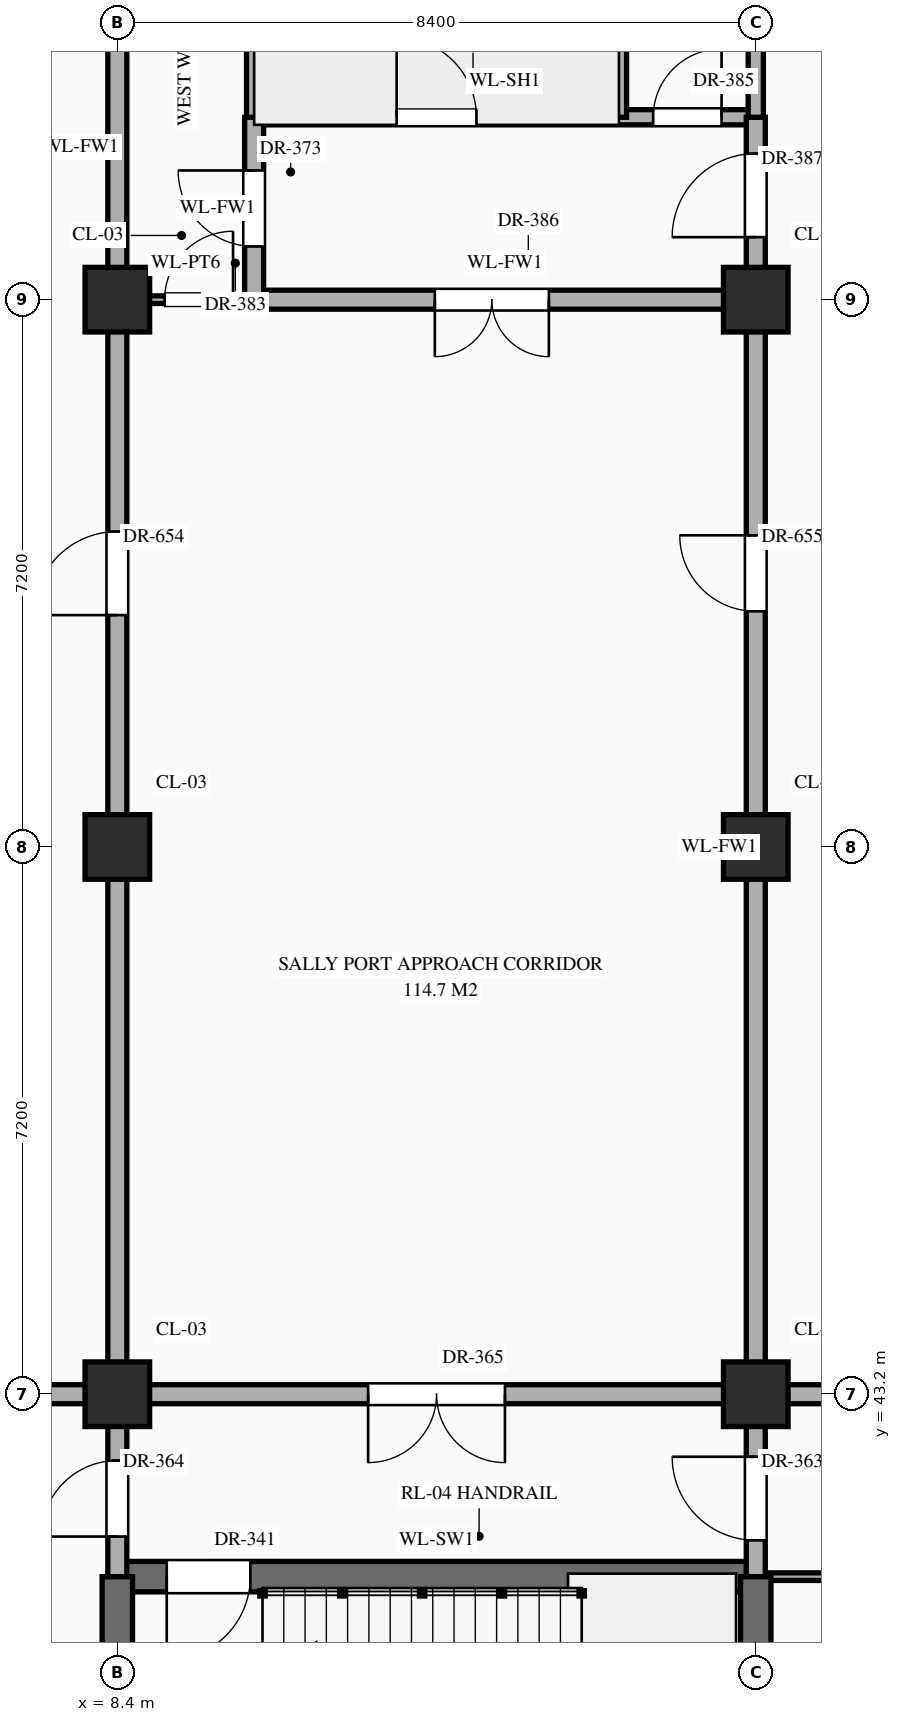
"""IFC4 building model, lengths in metres.
Left out: names, types, materials, properties, quantities, classifications, styles, units other than length and angle.
Written with IfcOpenShell. Run it as: python <this file> out.ifc"""

import sys

from ifc_helpers import new_model, si_unit, direction, frame, frame_2d, origin, origin_2d, place, context, subcontext, project, spatial, rectangle, extrude, element, fill, save


model = new_model("IFC4")
c1 = context("Model", 3, precision=1e-05, world=origin(), true_north=direction((0.0, 1.0)))
c2 = subcontext(c1, "Body", "Model", "MODEL_VIEW")
j1 = project(units=[si_unit("LENGTHUNIT", "METRE"), si_unit("PLANEANGLEUNIT", "RADIAN")], contexts=[c1])
p1 = place(None, origin())
s1 = spatial("IfcSite", under=j1, at=p1, CompositionType="ELEMENT")
p2 = place(p1, origin())
s2 = spatial("IfcBuilding", under=s1, at=p2, CompositionType="ELEMENT")
p3 = place(p2, frame((0.0, 0.0, -5.4)))
s3 = spatial("IfcBuildingStorey", under=s2, at=p3, CompositionType="ELEMENT", Elevation=-5.4)
for number, where, z_axis, x_axis in (
    (1, (8.4, 43.2, 0.0), (0.0, 0.0, 1.0), (1.0, 0.0, 0.0)),
    (2, (8.4, 50.4, 0.0), (0.0, 0.0, 1.0), (1.0, 0.0, 0.0)),
    (3, (8.4, 57.6, 0.0), (0.0, 0.0, 1.0), (1.0, 0.0, 0.0)),
    (4, (16.8, 43.2, 0.0), (0.0, 0.0, 1.0), (1.0, 0.0, 0.0)),
    (5, (16.8, 50.4, 0.0), (0.0, 0.0, 1.0), (1.0, 0.0, 0.0)),
    (6, (16.8, 57.6, 0.0), (0.0, 0.0, 1.0), (1.0, 0.0, 0.0)),
):
    element("IfcColumn", number, at=place(p3, frame(where, z_axis=z_axis, x_axis=x_axis)), inside=s3, PredefinedType="COLUMN", context=c2, shape_type="SweptSolid", body=[
        extrude(rectangle(XDim=0.85, YDim=0.85, at=origin_2d()), origin(), (0.0, 0.0, 1.0), 5.4),
    ])
p4 = place(p3, frame((8.4, 40.8, 0.0), z_axis=(0.0, 0.0, 1.0), x_axis=(1.0, 0.0, 0.0)))
e7 = element("IfcWall", 7, at=p4, inside=s3, PredefinedType="SHEAR", context=c2, shape_type="SweptSolid", body=[
    extrude(rectangle(XDim=8.4, YDim=0.4, at=frame_2d((4.2, 0.0))), origin(), (0.0, 0.0, 1.0), 5.1),
])
p5 = place(p4, frame((0.65, 0.0, 0.0)))
e8 = element("IfcOpeningElement", 8, at=p5, cuts=e7, PredefinedType="OPENING", context=c2, shape_type="SweptSolid", body=[
    extrude(rectangle(XDim=1.1, YDim=2.2, at=frame_2d((0.55, 1.1))), frame((0.0, 0.212, 0.0), z_axis=(0.0, -1.0, 0.0), x_axis=(1.0, 0.0, 0.0)), (0.0, 0.0, 1.0), 0.424),
])
p6 = place(p3, frame((16.8, 40.8, 0.0), z_axis=(0.0, 0.0, 1.0), x_axis=(1.0, 0.0, 0.0)))
e9 = element("IfcWall", 9, at=p6, inside=s3, PredefinedType="STANDARD", context=c2, shape_type="SweptSolid", body=[
    extrude(rectangle(XDim=61.6, YDim=0.1, at=frame_2d((30.8, 0.0))), origin(), (0.0, 0.0, 1.0), 4.98),
])
p7 = place(p6, frame((30.32, 0.0, 0.0)))
e10 = element("IfcOpeningElement", 10, at=p7, cuts=e9, PredefinedType="OPENING", context=c2, shape_type="SweptSolid", body=[
    extrude(rectangle(XDim=0.96, YDim=2.2, at=frame_2d((0.48, 1.1))), frame((0.0, 0.062, 0.0), z_axis=(0.0, -1.0, 0.0), x_axis=(1.0, 0.0, 0.0)), (0.0, 0.0, 1.0), 0.124),
])
p8 = place(p3, frame((0.04, 43.2, 0.0), z_axis=(0.0, 0.0, 1.0), x_axis=(1.0, 0.0, 0.0)))
e11 = element("IfcWall", 11, at=p8, inside=s3, PredefinedType="STANDARD", context=c2, shape_type="SweptSolid", body=[
    extrude(rectangle(XDim=50.36, YDim=0.25, at=frame_2d((25.18, 0.0))), origin(), (0.0, 0.0, 1.0), 4.13),
])
p9 = place(p8, frame((11.66, 0.0, 0.0)))
e12 = element("IfcOpeningElement", 12, at=p9, cuts=e11, PredefinedType="OPENING", context=c2, shape_type="SweptSolid", body=[
    extrude(rectangle(XDim=1.8, YDim=2.35, at=frame_2d((0.9, 1.175))), frame((0.0, 0.137, 0.0), z_axis=(0.0, -1.0, 0.0), x_axis=(1.0, 0.0, 0.0)), (0.0, 0.0, 1.0), 0.274),
])
p10 = place(p8, frame((28.885, 0.0, 0.0)))
e13 = element("IfcOpeningElement", 13, at=p10, cuts=e11, PredefinedType="OPENING", context=c2, shape_type="SweptSolid", body=[
    extrude(rectangle(XDim=0.95, YDim=2.15, at=frame_2d((0.475, 1.075))), frame((0.0, 0.137, 0.0), z_axis=(0.0, -1.0, 0.0), x_axis=(1.0, 0.0, 0.0)), (0.0, 0.0, 1.0), 0.274),
])
p11 = place(p3, frame((8.4, 57.6, 0.0), z_axis=(0.0, 0.0, 1.0), x_axis=(1.0, 0.0, 0.0)))
e14 = element("IfcWall", 14, at=p11, inside=s3, PredefinedType="STANDARD", context=c2, shape_type="SweptSolid", body=[
    extrude(rectangle(XDim=1.8, YDim=0.1, at=frame_2d((0.9, 0.0))), origin(), (0.0, 0.0, 1.0), 4.25),
])
p12 = place(p11, frame((0.623, 0.0, 0.0)))
e15 = element("IfcOpeningElement", 15, at=p12, cuts=e14, PredefinedType="OPENING", context=c2, shape_type="SweptSolid", body=[
    extrude(rectangle(XDim=0.9, YDim=2.15, at=frame_2d((0.45, 1.075))), frame((0.0, 0.062, 0.0), z_axis=(0.0, -1.0, 0.0), x_axis=(1.0, 0.0, 0.0)), (0.0, 0.0, 1.0), 0.124),
])
p13 = place(p3, frame((10.2, 57.6, 0.0), z_axis=(0.0, 0.0, 1.0), x_axis=(1.0, 0.0, 0.0)))
e16 = element("IfcWall", 16, at=p13, inside=s3, PredefinedType="STANDARD", context=c2, shape_type="SweptSolid", body=[
    extrude(rectangle(XDim=6.6, YDim=0.25, at=frame_2d((3.3, 0.0))), origin(), (0.0, 0.0, 1.0), 4.25),
])
p14 = place(p13, frame((2.377, 0.0, 0.0)))
e17 = element("IfcOpeningElement", 17, at=p14, cuts=e16, PredefinedType="OPENING", context=c2, shape_type="SweptSolid", body=[
    extrude(rectangle(XDim=1.5, YDim=2.25, at=frame_2d((0.75, 1.125))), frame((0.0, 0.137, 0.0), z_axis=(0.0, -1.0, 0.0), x_axis=(1.0, 0.0, 0.0)), (0.0, 0.0, 1.0), 0.274),
])
p15 = place(p3, frame((10.2, 60.0, 0.0), z_axis=(0.0, 0.0, 1.0), x_axis=(1.0, 0.0, 0.0)))
e18 = element("IfcWall", 18, at=p15, inside=s3, PredefinedType="STANDARD", context=c2, shape_type="SweptSolid", body=[
    extrude(rectangle(XDim=6.6, YDim=0.2, at=frame_2d((3.3, 0.0))), origin(), (0.0, 0.0, 1.0), 5.1),
])
p16 = place(p15, frame((1.875, 0.0, 0.0)))
e19 = element("IfcOpeningElement", 19, at=p16, cuts=e18, PredefinedType="OPENING", context=c2, shape_type="SweptSolid", body=[
    extrude(rectangle(XDim=1.05, YDim=2.2, at=frame_2d((0.525, 1.1))), frame((0.0, 0.112, 0.0), z_axis=(0.0, -1.0, 0.0), x_axis=(1.0, 0.0, 0.0)), (0.0, 0.0, 1.0), 0.224),
])
p17 = place(p15, frame((5.25, 0.0, 0.0)))
e20 = element("IfcOpeningElement", 20, at=p17, cuts=e18, PredefinedType="OPENING", context=c2, shape_type="SweptSolid", body=[
    extrude(rectangle(XDim=0.9, YDim=2.1, at=frame_2d((0.45, 1.05))), frame((0.0, 0.112, 0.0), z_axis=(0.0, -1.0, 0.0), x_axis=(1.0, 0.0, 0.0)), (0.0, 0.0, 1.0), 0.224),
])
p18 = place(p3, frame((8.4, 36.0, 0.0), z_axis=(0.0, 0.0, 1.0), x_axis=(0.0, 1.0, 0.0)))
e21 = element("IfcWall", 21, at=p18, inside=s3, PredefinedType="SHEAR", context=c2, shape_type="SweptSolid", body=[
    extrude(rectangle(XDim=4.8, YDim=0.4, at=frame_2d((2.4, 0.0))), origin(), (0.0, 0.0, 1.0), 5.1),
])
p19 = place(p3, frame((8.4, 40.8, 0.0), z_axis=(0.0, 0.0, 1.0), x_axis=(0.0, 1.0, 0.0)))
e22 = element("IfcWall", 22, at=p19, inside=s3, PredefinedType="STANDARD", context=c2, shape_type="SweptSolid", body=[
    extrude(rectangle(XDim=38.4, YDim=0.25, at=frame_2d((19.2, 0.0))), origin(), (0.0, 0.0, 1.0), 4.35),
])
p20 = place(p19, frame((0.528, 0.0, 0.0)))
e23 = element("IfcOpeningElement", 23, at=p20, cuts=e22, PredefinedType="OPENING", context=c2, shape_type="SweptSolid", body=[
    extrude(rectangle(XDim=1.0, YDim=2.2, at=frame_2d((0.5, 1.1))), frame((0.0, 0.137, 0.0), z_axis=(0.0, -1.0, 0.0), x_axis=(1.0, 0.0, 0.0)), (0.0, 0.0, 1.0), 0.274),
])
p21 = place(p19, frame((27.1, 0.0, 0.0)))
e24 = element("IfcOpeningElement", 24, at=p21, cuts=e22, PredefinedType="OPENING", context=c2, shape_type="SweptSolid", body=[
    extrude(rectangle(XDim=1.0, YDim=2.2, at=frame_2d((0.5, 1.1))), frame((0.0, 0.137, 0.0), z_axis=(0.0, -1.0, 0.0), x_axis=(1.0, 0.0, 0.0)), (0.0, 0.0, 1.0), 0.274),
])
p22 = place(p19, frame((12.65, 0.0, 0.0)))
e25 = element("IfcOpeningElement", 25, at=p22, cuts=e22, PredefinedType="OPENING", context=c2, shape_type="SweptSolid", body=[
    extrude(rectangle(XDim=1.1, YDim=2.2, at=frame_2d((0.55, 1.1))), frame((0.0, 0.137, 0.0), z_axis=(0.0, -1.0, 0.0), x_axis=(1.0, 0.0, 0.0)), (0.0, 0.0, 1.0), 0.274),
])
p23 = place(p3, frame((10.2, 57.6, 0.0), z_axis=(0.0, 0.0, 1.0), x_axis=(0.0, 1.0, 0.0)))
e26 = element("IfcWall", 26, at=p23, inside=s3, PredefinedType="STANDARD", context=c2, shape_type="SweptSolid", body=[
    extrude(rectangle(XDim=2.4, YDim=0.25, at=frame_2d((1.2, 0.0))), origin(), (0.0, 0.0, 1.0), 5.1),
])
p24 = place(p23, frame((0.7, 0.0, 0.0)))
e27 = element("IfcOpeningElement", 27, at=p24, cuts=e26, PredefinedType="OPENING", context=c2, shape_type="SweptSolid", body=[
    extrude(rectangle(XDim=1.0, YDim=2.2, at=frame_2d((0.5, 1.1))), frame((0.0, 0.137, 0.0), z_axis=(0.0, -1.0, 0.0), x_axis=(1.0, 0.0, 0.0)), (0.0, 0.0, 1.0), 0.274),
])
for number, where, z_axis, x_axis in (
    (28, (10.2, 60.0, 0.0), (0.0, 0.0, 1.0), (0.0, 1.0, 0.0)),
    (29, (15.0, 60.0, 0.0), (0.0, 0.0, 1.0), (0.0, 1.0, 0.0)),
):
    element("IfcWall", number, at=place(p3, frame(where, z_axis=z_axis, x_axis=x_axis)), inside=s3, PredefinedType="STANDARD", context=c2, shape_type="SweptSolid", body=[
        extrude(rectangle(XDim=48.0, YDim=0.2, at=frame_2d((24.0, 0.0))), origin(), (0.0, 0.0, 1.0), 5.1),
    ])
p25 = place(p3, frame((16.8, 36.0, 0.0), z_axis=(0.0, 0.0, 1.0), x_axis=(0.0, 1.0, 0.0)))
e30 = element("IfcWall", 30, at=p25, inside=s3, PredefinedType="SHEAR", context=c2, shape_type="SweptSolid", body=[
    extrude(rectangle(XDim=4.8, YDim=0.4, at=frame_2d((2.4, 0.0))), origin(), (0.0, 0.0, 1.0), 5.1),
])
p26 = place(p3, frame((16.8, 40.8, 0.0), z_axis=(0.0, 0.0, 1.0), x_axis=(0.0, 1.0, 0.0)))
e31 = element("IfcWall", 31, at=p26, inside=s3, PredefinedType="STANDARD", context=c2, shape_type="SweptSolid", body=[
    extrude(rectangle(XDim=19.2, YDim=0.25, at=frame_2d((9.6, 0.0))), origin(), (0.0, 0.0, 1.0), 4.23),
])
p27 = place(p26, frame((0.478, 0.0, 0.0)))
e32 = element("IfcOpeningElement", 32, at=p27, cuts=e31, PredefinedType="OPENING", context=c2, shape_type="SweptSolid", body=[
    extrude(rectangle(XDim=1.1, YDim=2.2, at=frame_2d((0.55, 1.1))), frame((0.0, 0.137, 0.0), z_axis=(0.0, -1.0, 0.0), x_axis=(1.0, 0.0, 0.0)), (0.0, 0.0, 1.0), 0.274),
])
p28 = place(p26, frame((17.623, 0.0, 0.0)))
e33 = element("IfcOpeningElement", 33, at=p28, cuts=e31, PredefinedType="OPENING", context=c2, shape_type="SweptSolid", body=[
    extrude(rectangle(XDim=1.1, YDim=2.2, at=frame_2d((0.55, 1.1))), frame((0.0, 0.137, 0.0), z_axis=(0.0, -1.0, 0.0), x_axis=(1.0, 0.0, 0.0)), (0.0, 0.0, 1.0), 0.274),
])
p29 = place(p26, frame((12.7, 0.0, 0.0)))
e34 = element("IfcOpeningElement", 34, at=p29, cuts=e31, PredefinedType="OPENING", context=c2, shape_type="SweptSolid", body=[
    extrude(rectangle(XDim=1.0, YDim=2.2, at=frame_2d((0.5, 1.1))), frame((0.0, 0.137, 0.0), z_axis=(0.0, -1.0, 0.0), x_axis=(1.0, 0.0, 0.0)), (0.0, 0.0, 1.0), 0.274),
])
p30 = place(p3, frame((16.8, 60.0, 0.0), z_axis=(0.0, 0.0, 1.0), x_axis=(0.0, 1.0, 0.0)))
e35 = element("IfcWall", 35, at=p30, inside=s3, PredefinedType="STANDARD", context=c2, shape_type="SweptSolid", body=[
    extrude(rectangle(XDim=26.4, YDim=0.2, at=frame_2d((13.2, 0.0))), origin(), (0.0, 0.0, 1.0), 4.23),
])
p31 = place(p5, frame((1.1, 0.0, 0.0), z_axis=(0.0, 0.0, 1.0), x_axis=(-1.0, 0.0, 0.0)))
e36 = element("IfcDoor", 36, at=p31, inside=s3, OperationType="SINGLE_SWING_RIGHT", PredefinedType="DOOR", context=c2, shape_type="SweptSolid", body=[
    extrude(rectangle(XDim=1.1, YDim=2.2, at=frame_2d((0.55, 1.1))), frame((0.0, 0.025, 0.0), z_axis=(0.0, -1.0, 0.0), x_axis=(1.0, 0.0, 0.0)), (0.0, 0.0, 1.0), 0.05),
])
fill(e8, e36)
p32 = place(p27, origin())
e37 = element("IfcDoor", 37, at=p32, inside=s3, OperationType="SINGLE_SWING_RIGHT", PredefinedType="DOOR", context=c2, shape_type="SweptSolid", body=[
    extrude(rectangle(XDim=1.1, YDim=2.2, at=frame_2d((0.55, 1.1))), frame((0.0, 0.025, 0.0), z_axis=(0.0, -1.0, 0.0), x_axis=(1.0, 0.0, 0.0)), (0.0, 0.0, 1.0), 0.05),
])
fill(e32, e37)
p33 = place(p20, origin())
e38 = element("IfcDoor", 38, at=p33, inside=s3, OperationType="SINGLE_SWING_LEFT", PredefinedType="DOOR", context=c2, shape_type="SweptSolid", body=[
    extrude(rectangle(XDim=1.0, YDim=2.2, at=frame_2d((0.5, 1.1))), frame((0.0, 0.025, 0.0), z_axis=(0.0, -1.0, 0.0), x_axis=(1.0, 0.0, 0.0)), (0.0, 0.0, 1.0), 0.05),
])
fill(e23, e38)
p34 = place(p9, frame((1.8, 0.0, 0.0), z_axis=(0.0, 0.0, 1.0), x_axis=(-1.0, 0.0, 0.0)))
e39 = element("IfcDoor", 39, at=p34, inside=s3, OperationType="DOUBLE_DOOR_SINGLE_SWING", PredefinedType="DOOR", context=c2, shape_type="SweptSolid", body=[
    extrude(rectangle(XDim=1.8, YDim=2.35, at=frame_2d((0.9, 1.175))), frame((0.0, 0.025, 0.0), z_axis=(0.0, -1.0, 0.0), x_axis=(1.0, 0.0, 0.0)), (0.0, 0.0, 1.0), 0.05),
])
fill(e12, e39)
p35 = place(p24, origin())
e40 = element("IfcDoor", 40, at=p35, inside=s3, OperationType="SINGLE_SWING_RIGHT", PredefinedType="DOOR", context=c2, shape_type="SweptSolid", body=[
    extrude(rectangle(XDim=1.0, YDim=2.2, at=frame_2d((0.5, 1.1))), frame((0.0, 0.025, 0.0), z_axis=(0.0, -1.0, 0.0), x_axis=(1.0, 0.0, 0.0)), (0.0, 0.0, 1.0), 0.05),
])
fill(e27, e40)
p36 = place(p12, origin())
e41 = element("IfcDoor", 41, at=p36, inside=s3, OperationType="SINGLE_SWING_RIGHT", PredefinedType="DOOR", context=c2, shape_type="SweptSolid", body=[
    extrude(rectangle(XDim=0.9, YDim=2.15, at=frame_2d((0.45, 1.075))), frame((0.0, 0.025, 0.0), z_axis=(0.0, -1.0, 0.0), x_axis=(1.0, 0.0, 0.0)), (0.0, 0.0, 1.0), 0.05),
])
fill(e15, e41)
p37 = place(p16, origin())
e42 = element("IfcDoor", 42, at=p37, inside=s3, OperationType="SINGLE_SWING_LEFT", PredefinedType="DOOR", context=c2, shape_type="SweptSolid", body=[
    extrude(rectangle(XDim=1.05, YDim=2.2, at=frame_2d((0.525, 1.1))), frame((0.0, 0.025, 0.0), z_axis=(0.0, -1.0, 0.0), x_axis=(1.0, 0.0, 0.0)), (0.0, 0.0, 1.0), 0.05),
])
fill(e19, e42)
p38 = place(p17, origin())
e43 = element("IfcDoor", 43, at=p38, inside=s3, OperationType="SINGLE_SWING_RIGHT", PredefinedType="DOOR", context=c2, shape_type="SweptSolid", body=[
    extrude(rectangle(XDim=0.9, YDim=2.1, at=frame_2d((0.45, 1.05))), frame((0.0, 0.025, 0.0), z_axis=(0.0, -1.0, 0.0), x_axis=(1.0, 0.0, 0.0)), (0.0, 0.0, 1.0), 0.05),
])
fill(e20, e43)
p39 = place(p14, frame((1.5, 0.0, 0.0), z_axis=(0.0, 0.0, 1.0), x_axis=(-1.0, 0.0, 0.0)))
e44 = element("IfcDoor", 44, at=p39, inside=s3, OperationType="DOUBLE_DOOR_SINGLE_SWING", PredefinedType="DOOR", context=c2, shape_type="SweptSolid", body=[
    extrude(rectangle(XDim=1.5, YDim=2.25, at=frame_2d((0.75, 1.125))), frame((0.0, 0.025, 0.0), z_axis=(0.0, -1.0, 0.0), x_axis=(1.0, 0.0, 0.0)), (0.0, 0.0, 1.0), 0.05),
])
fill(e17, e44)
p40 = place(p28, origin())
e45 = element("IfcDoor", 45, at=p40, inside=s3, OperationType="SINGLE_SWING_LEFT", PredefinedType="DOOR", context=c2, shape_type="SweptSolid", body=[
    extrude(rectangle(XDim=1.1, YDim=2.2, at=frame_2d((0.55, 1.1))), frame((0.0, 0.025, 0.0), z_axis=(0.0, -1.0, 0.0), x_axis=(1.0, 0.0, 0.0)), (0.0, 0.0, 1.0), 0.05),
])
fill(e33, e45)
p41 = place(p22, origin())
e46 = element("IfcDoor", 46, at=p41, inside=s3, OperationType="SINGLE_SWING_LEFT", PredefinedType="DOOR", context=c2, shape_type="SweptSolid", body=[
    extrude(rectangle(XDim=1.1, YDim=2.2, at=frame_2d((0.55, 1.1))), frame((0.0, 0.025, 0.0), z_axis=(0.0, -1.0, 0.0), x_axis=(1.0, 0.0, 0.0)), (0.0, 0.0, 1.0), 0.05),
])
fill(e25, e46)
p42 = place(p29, origin())
e47 = element("IfcDoor", 47, at=p42, inside=s3, OperationType="SINGLE_SWING_RIGHT", PredefinedType="DOOR", context=c2, shape_type="SweptSolid", body=[
    extrude(rectangle(XDim=1.0, YDim=2.2, at=frame_2d((0.5, 1.1))), frame((0.0, 0.025, 0.0), z_axis=(0.0, -1.0, 0.0), x_axis=(1.0, 0.0, 0.0)), (0.0, 0.0, 1.0), 0.05),
])
fill(e34, e47)
save(model, sys.argv[1])
